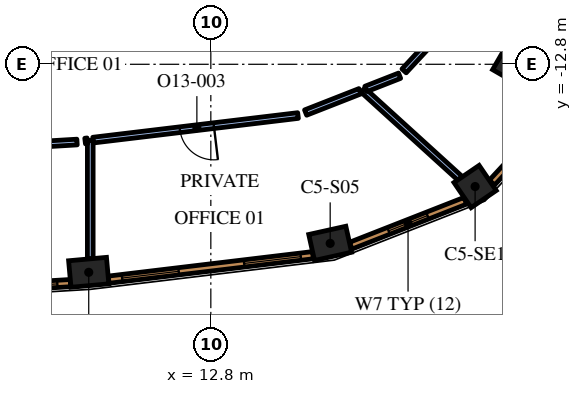
"""IFC4 building model, lengths in metres.
Left out: names, types, materials, properties, quantities, classifications, styles, units other than length and angle.
Written with IfcOpenShell. Run it as: python <this file> out.ifc"""

import sys

from ifc_helpers import new_model, si_unit, direction, frame, frame_2d, origin, origin_2d, place, context, subcontext, project, spatial, rectangle, extrude, element, fill, save


model = new_model("IFC4")
c1 = context("Model", 3, precision=1e-05, world=origin(), true_north=direction((0.0, 1.0)))
c2 = subcontext(c1, "Body", "Model", "MODEL_VIEW")
j1 = project(units=[si_unit("LENGTHUNIT", "METRE"), si_unit("PLANEANGLEUNIT", "RADIAN")], contexts=[c1])
p1 = place(None, origin())
s1 = spatial("IfcSite", under=j1, at=p1, CompositionType="ELEMENT")
p2 = place(p1, origin())
s2 = spatial("IfcBuilding", under=s1, at=p2, CompositionType="ELEMENT")
p3 = place(p2, frame((0.0, 0.0, 292.2)))
s3 = spatial("IfcBuildingStorey", under=s2, at=p3, CompositionType="ELEMENT", Elevation=292.2)
p4 = place(p3, frame((21.718, -12.539, 0.0), z_axis=(0.0, 0.0, 1.0), x_axis=(0.866025403784, -0.5, 0.0)))
e1 = element("IfcColumn", 1, at=p4, inside=s3, PredefinedType="COLUMN", context=c2, shape_type="SweptSolid", body=[
    extrude(rectangle(XDim=2.2, YDim=2.2, at=origin_2d()), origin(), (0.0, 0.0, 1.0), 4.2),
])
for number, where, z_axis, x_axis in (
    (2, (9.587, -18.274, 0.0), (0.0, 0.0, 1.0), (0.996, 0.089, 0.0)),
    (3, (15.941, -17.512, 0.0), (0.0, 0.0, 1.0), (0.976, 0.217, 0.0)),
):
    element("IfcColumn", number, at=place(p3, frame(where, z_axis=z_axis, x_axis=x_axis)), inside=s3, PredefinedType="COLUMN", context=c2, shape_type="SweptSolid", body=[
        extrude(rectangle(XDim=1.0, YDim=0.7, at=origin_2d()), origin(), (0.0, 0.0, 1.0), 4.2),
    ])
p5 = place(p3, frame((19.754, -16.017, 0.0), z_axis=(0.0, 0.0, 1.0), x_axis=(0.826362775296, 0.563138139008, 0.0)))
e4 = element("IfcColumn", 4, at=p5, inside=s3, PredefinedType="COLUMN", context=c2, shape_type="SweptSolid", body=[
    extrude(rectangle(XDim=0.8, YDim=0.8, at=origin_2d()), origin(), (0.0, 0.0, 1.0), 4.2),
])
p6 = place(p3, frame((9.627, -14.804, 0.0), z_axis=(0.0, 0.0, 1.0), x_axis=(0.0, -1.0, 0.0)))
e5 = element("IfcWall", 5, at=p6, inside=s3, PredefinedType="PARTITIONING", context=c2, shape_type="SweptSolid", body=[
    extrude(rectangle(XDim=3.115, YDim=0.15, at=frame_2d((1.557, 0.0))), origin(), (0.0, 0.0, 1.0), 3.55),
])
p7 = place(p3, frame((9.28, -14.846, 0.0), z_axis=(0.0, 0.0, 1.0), x_axis=(-0.998221600551, -0.059612382886, 0.0)))
e6 = element("IfcWall", 6, at=p7, inside=s3, PredefinedType="PARTITIONING", context=c2, shape_type="SweptSolid", body=[
    extrude(rectangle(XDim=5.979, YDim=0.15, at=frame_2d((2.99, 0.0))), origin(), (0.0, 0.0, 1.0), 3.55),
])
p8 = place(p7, frame((2.58, 0.0, 0.0)))
e7 = element("IfcOpeningElement", 7, at=p8, cuts=e6, PredefinedType="OPENING", context=c2, shape_type="SweptSolid", body=[
    extrude(rectangle(XDim=0.9, YDim=2.1, at=frame_2d((0.45, 1.05))), frame((0.0, 0.085, 0.0), z_axis=(0.0, -1.0, 0.0), x_axis=(1.0, 0.0, 0.0)), (0.0, 0.0, 1.0), 0.17),
])
p9 = place(p3, frame((9.492, -14.82, 0.0), z_axis=(0.0, 0.0, 1.0), x_axis=(0.993123019804, 0.117075477944, 0.0)))
e8 = element("IfcWall", 8, at=p9, inside=s3, PredefinedType="PARTITIONING", context=c2, shape_type="SweptSolid", body=[
    extrude(rectangle(XDim=0.061, YDim=0.15, at=frame_2d((0.03, 0.0))), origin(), (0.0, 0.0, 1.0), 3.55),
])
p10 = place(p3, frame((16.803, -13.479, 0.0), z_axis=(0.0, 0.0, 1.0), x_axis=(0.740052004703, -0.672549648974, 0.0)))
e9 = element("IfcWall", 9, at=p10, inside=s3, PredefinedType="PARTITIONING", context=c2, shape_type="SweptSolid", body=[
    extrude(rectangle(XDim=3.454, YDim=0.15, at=frame_2d((1.727, 0.0))), origin(), (0.0, 0.0, 1.0), 3.55),
])
p11 = place(p3, frame((15.094, -14.149, 0.0), z_axis=(0.0, 0.0, 1.0), x_axis=(-0.992889171133, -0.119042403566, 0.0)))
e10 = element("IfcWall", 10, at=p11, inside=s3, PredefinedType="PARTITIONING", context=c2, shape_type="SweptSolid", body=[
    extrude(rectangle(XDim=5.431, YDim=0.15, at=frame_2d((2.715, 0.0))), origin(), (0.0, 0.0, 1.0), 3.55),
])
p12 = place(p11, frame((2.231, 0.0, 0.0)))
e11 = element("IfcOpeningElement", 11, at=p12, cuts=e10, PredefinedType="OPENING", context=c2, shape_type="SweptSolid", body=[
    extrude(rectangle(XDim=0.9, YDim=2.1, at=frame_2d((0.45, 1.05))), frame((0.0, 0.085, 0.0), z_axis=(0.0, -1.0, 0.0), x_axis=(1.0, 0.0, 0.0)), (0.0, 0.0, 1.0), 0.17),
])
p13 = place(p3, frame((15.294, -14.071, 0.0), z_axis=(0.0, 0.0, 1.0), x_axis=(0.930996486245, 0.365028139463, 0.0)))
e12 = element("IfcWall", 12, at=p13, inside=s3, PredefinedType="PARTITIONING", context=c2, shape_type="SweptSolid", body=[
    extrude(rectangle(XDim=1.537, YDim=0.15, at=frame_2d((0.769, 0.0))), origin(), (0.0, 0.0, 1.0), 3.55),
])
p14 = place(p3, frame((16.881, -13.448, 0.0), z_axis=(0.0, 0.0, 1.0), x_axis=(0.930913400557, 0.365239976815, 0.0)))
e13 = element("IfcWall", 13, at=p14, inside=s3, PredefinedType="PARTITIONING", context=c2, shape_type="SweptSolid", body=[
    extrude(rectangle(XDim=0.953, YDim=0.15, at=frame_2d((0.476, 0.0))), origin(), (0.0, 0.0, 1.0), 3.55),
])
p15 = place(p3, frame((17.885, -12.974, 0.0), z_axis=(0.0, 0.0, 1.0), x_axis=(0.680200271904, 0.733026322926, 0.0)))
e14 = element("IfcWall", 14, at=p15, inside=s3, PredefinedType="PARTITIONING", context=c2, shape_type="SweptSolid", body=[
    extrude(rectangle(XDim=2.352, YDim=0.15, at=frame_2d((1.176, 0.0))), origin(), (0.0, 0.0, 1.0), 3.55),
])
p16 = place(p3, frame((3.71, -18.88, 0.0), z_axis=(0.0, 0.0, 1.0), x_axis=(0.998221492823, 0.059614186786, 0.0)))
e15 = element("IfcWall", 15, at=p16, inside=s3, PredefinedType="SOLIDWALL", context=c2, shape_type="SweptSolid", body=[
    extrude(rectangle(XDim=5.406, YDim=0.19, at=frame_2d((2.703, 0.0))), origin(), (0.0, 0.0, 1.0), 3.95),
])
p17 = place(p16, frame((0.346, 0.0, 0.6)))
e16 = element("IfcOpeningElement", 16, at=p17, cuts=e15, PredefinedType="OPENING", context=c2, shape_type="SweptSolid", body=[
    extrude(rectangle(XDim=1.5, YDim=2.85, at=frame_2d((0.75, 1.425))), frame((0.0, 0.105, 0.0), z_axis=(0.0, -1.0, 0.0), x_axis=(1.0, 0.0, 0.0)), (0.0, 0.0, 1.0), 0.21),
])
p18 = place(p16, frame((3.559, 0.0, 0.6)))
e17 = element("IfcOpeningElement", 17, at=p18, cuts=e15, PredefinedType="OPENING", context=c2, shape_type="SweptSolid", body=[
    extrude(rectangle(XDim=1.5, YDim=2.85, at=frame_2d((0.75, 1.425))), frame((0.0, 0.105, 0.0), z_axis=(0.0, -1.0, 0.0), x_axis=(1.0, 0.0, 0.0)), (0.0, 0.0, 1.0), 0.21),
])
p19 = place(p3, frame((10.111, -18.468, 0.0), z_axis=(0.0, 0.0, 1.0), x_axis=(0.992885582795, 0.119072328769, 0.0)))
e18 = element("IfcWall", 18, at=p19, inside=s3, PredefinedType="SOLIDWALL", context=c2, shape_type="SweptSolid", body=[
    extrude(rectangle(XDim=5.415, YDim=0.19, at=frame_2d((2.708, 0.0))), origin(), (0.0, 0.0, 1.0), 3.95),
])
p20 = place(p19, frame((0.357, 0.0, 0.6)))
e19 = element("IfcOpeningElement", 19, at=p20, cuts=e18, PredefinedType="OPENING", context=c2, shape_type="SweptSolid", body=[
    extrude(rectangle(XDim=1.5, YDim=2.85, at=frame_2d((0.75, 1.425))), frame((0.0, 0.105, 0.0), z_axis=(0.0, -1.0, 0.0), x_axis=(1.0, 0.0, 0.0)), (0.0, 0.0, 1.0), 0.21),
])
p21 = place(p19, frame((3.593, 0.0, 0.6)))
e20 = element("IfcOpeningElement", 20, at=p21, cuts=e18, PredefinedType="OPENING", context=c2, shape_type="SweptSolid", body=[
    extrude(rectangle(XDim=1.5, YDim=2.85, at=frame_2d((0.75, 1.425))), frame((0.0, 0.105, 0.0), z_axis=(0.0, -1.0, 0.0), x_axis=(1.0, 0.0, 0.0)), (0.0, 0.0, 1.0), 0.21),
])
p22 = place(p3, frame((16.483, -17.573, 0.0), z_axis=(0.0, 0.0, 1.0), x_axis=(0.93100888477, 0.364996515709, 0.0)))
e21 = element("IfcWall", 21, at=p22, inside=s3, PredefinedType="SOLIDWALL", context=c2, shape_type="SweptSolid", body=[
    extrude(rectangle(XDim=3.237, YDim=0.19, at=frame_2d((1.618, 0.0))), origin(), (0.0, 0.0, 1.0), 3.95),
])
p23 = place(p22, frame((1.068, 0.0, 0.6)))
e22 = element("IfcOpeningElement", 22, at=p23, cuts=e21, PredefinedType="OPENING", context=c2, shape_type="SweptSolid", body=[
    extrude(rectangle(XDim=1.1, YDim=2.85, at=frame_2d((0.55, 1.425))), frame((0.0, 0.105, 0.0), z_axis=(0.0, -1.0, 0.0), x_axis=(1.0, 0.0, 0.0)), (0.0, 0.0, 1.0), 0.21),
])
p24 = place(p3, frame((20.198, -15.914, 0.0), z_axis=(0.0, 0.0, 1.0), x_axis=(0.680219354823, 0.733008614768, 0.0)))
e23 = element("IfcWall", 23, at=p24, inside=s3, PredefinedType="SOLIDWALL", context=c2, shape_type="SweptSolid", body=[
    extrude(rectangle(XDim=2.627, YDim=0.19, at=frame_2d((1.313, 0.0))), origin(), (0.0, 0.0, 1.0), 3.95),
])
p25 = place(p24, frame((0.763, 0.0, 0.6)))
e24 = element("IfcOpeningElement", 24, at=p25, cuts=e23, PredefinedType="OPENING", context=c2, shape_type="SweptSolid", body=[
    extrude(rectangle(XDim=1.1, YDim=2.85, at=frame_2d((0.55, 1.425))), frame((0.0, 0.105, 0.0), z_axis=(0.0, -1.0, 0.0), x_axis=(1.0, 0.0, 0.0)), (0.0, 0.0, 1.0), 0.21),
])
p26 = place(p12, origin())
e25 = element("IfcDoor", 25, at=p26, inside=s3, OperationType="SINGLE_SWING_LEFT", PredefinedType="DOOR", context=c2, shape_type="SweptSolid", body=[
    extrude(rectangle(XDim=0.9, YDim=2.1, at=frame_2d((0.45, 1.05))), frame((0.0, 0.025, 0.0), z_axis=(0.0, -1.0, 0.0), x_axis=(1.0, 0.0, 0.0)), (0.0, 0.0, 1.0), 0.05),
])
fill(e11, e25)
p27 = place(p18, origin())
e26 = element("IfcWindow", 26, at=p27, inside=s3, PartitioningType="SINGLE_PANEL", PredefinedType="WINDOW", context=c2, shape_type="SweptSolid", body=[
    extrude(rectangle(XDim=1.5, YDim=2.85, at=frame_2d((0.75, 1.425))), frame((0.0, 0.045, 0.0), z_axis=(0.0, -1.0, 0.0), x_axis=(1.0, 0.0, 0.0)), (0.0, 0.0, 1.0), 0.06),
])
fill(e17, e26)
p28 = place(p20, origin())
e27 = element("IfcWindow", 27, at=p28, inside=s3, PartitioningType="SINGLE_PANEL", PredefinedType="WINDOW", context=c2, shape_type="SweptSolid", body=[
    extrude(rectangle(XDim=1.5, YDim=2.85, at=frame_2d((0.75, 1.425))), frame((0.0, 0.045, 0.0), z_axis=(0.0, -1.0, 0.0), x_axis=(1.0, 0.0, 0.0)), (0.0, 0.0, 1.0), 0.06),
])
fill(e19, e27)
p29 = place(p21, origin())
e28 = element("IfcWindow", 28, at=p29, inside=s3, PartitioningType="SINGLE_PANEL", PredefinedType="WINDOW", context=c2, shape_type="SweptSolid", body=[
    extrude(rectangle(XDim=1.5, YDim=2.85, at=frame_2d((0.75, 1.425))), frame((0.0, 0.045, 0.0), z_axis=(0.0, -1.0, 0.0), x_axis=(1.0, 0.0, 0.0)), (0.0, 0.0, 1.0), 0.06),
])
fill(e20, e28)
p30 = place(p23, origin())
e29 = element("IfcWindow", 29, at=p30, inside=s3, PartitioningType="SINGLE_PANEL", PredefinedType="WINDOW", context=c2, shape_type="SweptSolid", body=[
    extrude(rectangle(XDim=1.1, YDim=2.85, at=frame_2d((0.55, 1.425))), frame((0.0, 0.045, 0.0), z_axis=(0.0, -1.0, 0.0), x_axis=(1.0, 0.0, 0.0)), (0.0, 0.0, 1.0), 0.06),
])
fill(e22, e29)
save(model, sys.argv[1])
